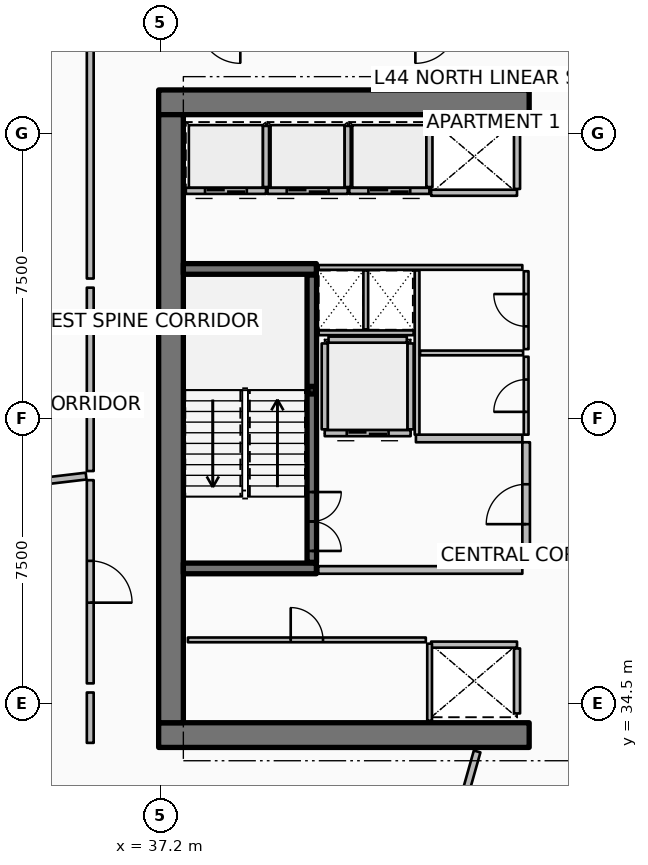
"""IFC4 building model, lengths in metres.
Left out: names, types, materials, properties, quantities, classifications, styles, units other than length and angle.
Written with IfcOpenShell. Run it as: python <this file> out.ifc"""

import sys

from ifc_helpers import new_model, si_unit, direction, frame, frame_2d, origin, origin_2d, place, context, subcontext, project, spatial, rectangle, hollow_rectangle, extrude, element, fill, save


model = new_model("IFC4")
c1 = context("Model", 3, precision=1e-05, world=origin(), true_north=direction((0.0, 1.0)))
c2 = subcontext(c1, "Body", "Model", "MODEL_VIEW")
j1 = project(units=[si_unit("LENGTHUNIT", "METRE"), si_unit("PLANEANGLEUNIT", "RADIAN")], contexts=[c1])
p1 = place(None, origin())
s1 = spatial("IfcSite", under=j1, at=p1, CompositionType="ELEMENT")
p2 = place(p1, origin())
s2 = spatial("IfcBuilding", under=s1, at=p2, CompositionType="ELEMENT")
p3 = place(p2, frame((0.0, 0.0, 176.55)))
s3 = spatial("IfcBuildingStorey", under=s2, at=p3, CompositionType="ELEMENT", Elevation=176.55)
for number, where, z_axis, x_axis in (
    (1, (37.15, 33.675, 0.0), (0.0, 0.0, 1.0), (1.0, 0.0, 0.0)),
    (2, (37.15, 50.325, 0.0), (0.0, 0.0, 1.0), (1.0, 0.0, 0.0)),
):
    element("IfcWall", number, at=place(p3, frame(where, z_axis=z_axis, x_axis=x_axis)), inside=s3, PredefinedType="SHEAR", context=c2, shape_type="SweptSolid", body=[
        extrude(rectangle(XDim=9.75, YDim=0.65, at=frame_2d((4.875, 0.0))), origin(), (0.0, 0.0, 1.0), 3.75),
    ])
p4 = place(p3, frame((37.475, 34.0, 0.0), z_axis=(0.0, 0.0, 1.0), x_axis=(0.0, 1.0, 0.0)))
e3 = element("IfcWall", 3, at=p4, inside=s3, PredefinedType="SHEAR", context=c2, shape_type="SweptSolid", body=[
    extrude(rectangle(XDim=16.0, YDim=0.65, at=frame_2d((8.0, 0.0))), origin(), (0.0, 0.0, 1.0), 3.75),
])
for number, where, z_axis, x_axis in (
    (4, (37.8, 38.06, 0.0), (0.0, 0.0, 1.0), (1.0, 0.0, 0.0)),
    (5, (37.8, 45.94, 0.0), (0.0, 0.0, 1.0), (1.0, 0.0, 0.0)),
):
    element("IfcWall", number, at=place(p3, frame(where, z_axis=z_axis, x_axis=x_axis)), inside=s3, PredefinedType="SHEAR", context=c2, shape_type="SweptSolid", body=[
        extrude(rectangle(XDim=3.5, YDim=0.28, at=frame_2d((1.75, 0.0))), origin(), (0.0, 0.0, 1.0), 3.75),
    ])
p5 = place(p3, frame((41.18, 42.75, 0.0), z_axis=(0.0, 0.0, 1.0), x_axis=(1.0, 0.0, 0.0)))
e6 = element("IfcColumn", 6, at=p5, inside=s3, PredefinedType="COLUMN", context=c2, shape_type="SweptSolid", body=[
    extrude(hollow_rectangle(XDim=0.2, YDim=0.2, WallThickness=0.01, InnerFilletRadius=0.01, OuterFilletRadius=0.02, at=origin_2d()), origin(), (0.0, 0.0, 1.0), 1.67),
])
p6 = place(p3, frame((41.18, 38.22, 0.0), z_axis=(0.0, 0.0, 1.0), x_axis=(0.0, 1.0, 0.0)))
e7 = element("IfcWall", 7, at=p6, inside=s3, PredefinedType="SOLIDWALL", context=c2, shape_type="SweptSolid", body=[
    extrude(rectangle(XDim=7.56, YDim=0.25, at=frame_2d((3.78, 0.0))), origin(), (0.0, 0.0, 1.0), 3.5),
])
p7 = place(p6, frame((0.3, 0.0, 0.0)))
e8 = element("IfcOpeningElement", 8, at=p7, cuts=e7, PredefinedType="OPENING", context=c2, shape_type="SweptSolid", body=[
    extrude(rectangle(XDim=1.55, YDim=2.15, at=frame_2d((0.775, 1.075))), frame((0.0, 0.135, 0.0), z_axis=(0.0, -1.0, 0.0), x_axis=(1.0, 0.0, 0.0)), (0.0, 0.0, 1.0), 0.27),
])
p8 = place(p3, frame((39.975, 47.995, 0.0), z_axis=(0.0, 0.0, 1.0), x_axis=(-1.0, 0.0, 0.0)))
e9 = element("IfcWall", 9, at=p8, inside=s3, PredefinedType="PARTITIONING", context=c2, shape_type="SweptSolid", body=[
    extrude(rectangle(XDim=2.11, YDim=0.16, at=frame_2d((1.055, 0.0))), origin(), (0.0, 0.0, 1.0), 3.5),
])
p9 = place(p8, frame((0.505, 0.0, 0.0)))
e10 = element("IfcOpeningElement", 10, at=p9, cuts=e9, PredefinedType="OPENING", context=c2, shape_type="SweptSolid", body=[
    extrude(rectangle(XDim=1.1, YDim=2.1, at=frame_2d((0.55, 1.05))), frame((0.0, 0.09, 0.0), z_axis=(0.0, -1.0, 0.0), x_axis=(1.0, 0.0, 0.0)), (0.0, 0.0, 1.0), 0.18),
])
p10 = place(p3, frame((39.975, 48.095, 0.0), z_axis=(0.0, 0.0, 1.0), x_axis=(0.0, 1.0, 0.0)))
e11 = element("IfcWall", 11, at=p10, inside=s3, PredefinedType="PARTITIONING", context=c2, shape_type="SweptSolid", body=[
    extrude(rectangle(XDim=1.61, YDim=0.16, at=frame_2d((0.805, 0.0))), origin(), (0.0, 0.0, 1.0), 3.5),
])
p11 = place(p3, frame((42.125, 47.995, 0.0), z_axis=(0.0, 0.0, 1.0), x_axis=(-1.0, 0.0, 0.0)))
e12 = element("IfcWall", 12, at=p11, inside=s3, PredefinedType="PARTITIONING", context=c2, shape_type="SweptSolid", body=[
    extrude(rectangle(XDim=2.11, YDim=0.16, at=frame_2d((1.055, 0.0))), origin(), (0.0, 0.0, 1.0), 3.5),
])
p12 = place(p11, frame((0.505, 0.0, 0.0)))
e13 = element("IfcOpeningElement", 13, at=p12, cuts=e12, PredefinedType="OPENING", context=c2, shape_type="SweptSolid", body=[
    extrude(rectangle(XDim=1.1, YDim=2.1, at=frame_2d((0.55, 1.05))), frame((0.0, 0.09, 0.0), z_axis=(0.0, -1.0, 0.0), x_axis=(1.0, 0.0, 0.0)), (0.0, 0.0, 1.0), 0.18),
])
p13 = place(p3, frame((42.125, 48.095, 0.0), z_axis=(0.0, 0.0, 1.0), x_axis=(0.0, 1.0, 0.0)))
e14 = element("IfcWall", 14, at=p13, inside=s3, PredefinedType="PARTITIONING", context=c2, shape_type="SweptSolid", body=[
    extrude(rectangle(XDim=1.61, YDim=0.16, at=frame_2d((0.805, 0.0))), origin(), (0.0, 0.0, 1.0), 3.5),
])
p14 = place(p3, frame((44.275, 47.995, 0.0), z_axis=(0.0, 0.0, 1.0), x_axis=(-1.0, 0.0, 0.0)))
e15 = element("IfcWall", 15, at=p14, inside=s3, PredefinedType="PARTITIONING", context=c2, shape_type="SweptSolid", body=[
    extrude(rectangle(XDim=2.11, YDim=0.16, at=frame_2d((1.055, 0.0))), origin(), (0.0, 0.0, 1.0), 3.5),
])
p15 = place(p14, frame((0.505, 0.0, 0.0)))
e16 = element("IfcOpeningElement", 16, at=p15, cuts=e15, PredefinedType="OPENING", context=c2, shape_type="SweptSolid", body=[
    extrude(rectangle(XDim=1.1, YDim=2.1, at=frame_2d((0.55, 1.05))), frame((0.0, 0.09, 0.0), z_axis=(0.0, -1.0, 0.0), x_axis=(1.0, 0.0, 0.0)), (0.0, 0.0, 1.0), 0.18),
])
p16 = place(p3, frame((44.275, 48.095, 0.0), z_axis=(0.0, 0.0, 1.0), x_axis=(0.0, 1.0, 0.0)))
e17 = element("IfcWall", 17, at=p16, inside=s3, PredefinedType="PARTITIONING", context=c2, shape_type="SweptSolid", body=[
    extrude(rectangle(XDim=1.61, YDim=0.16, at=frame_2d((0.805, 0.0))), origin(), (0.0, 0.0, 1.0), 3.5),
])
p17 = place(p3, frame((46.58, 47.945, 0.0), z_axis=(0.0, 0.0, 1.0), x_axis=(-1.0, 0.0, 0.0)))
e18 = element("IfcWall", 18, at=p17, inside=s3, PredefinedType="PARTITIONING", context=c2, shape_type="SweptSolid", body=[
    extrude(rectangle(XDim=2.26, YDim=0.16, at=frame_2d((1.13, 0.0))), origin(), (0.0, 0.0, 1.0), 3.5),
])
p18 = place(p3, frame((46.58, 48.045, 0.0), z_axis=(0.0, 0.0, 1.0), x_axis=(0.0, 1.0, 0.0)))
e19 = element("IfcWall", 19, at=p18, inside=s3, PredefinedType="PARTITIONING", context=c2, shape_type="SweptSolid", body=[
    extrude(rectangle(XDim=1.71, YDim=0.16, at=frame_2d((0.855, 0.0))), origin(), (0.0, 0.0, 1.0), 3.5),
])
p19 = place(p3, frame((44.32, 36.055, 0.0), z_axis=(0.0, 0.0, 1.0), x_axis=(1.0, 0.0, 0.0)))
e20 = element("IfcWall", 20, at=p19, inside=s3, PredefinedType="PARTITIONING", context=c2, shape_type="SweptSolid", body=[
    extrude(rectangle(XDim=2.26, YDim=0.16, at=frame_2d((1.13, 0.0))), origin(), (0.0, 0.0, 1.0), 3.5),
])
p20 = place(p3, frame((46.58, 34.245, 0.0), z_axis=(0.0, 0.0, 1.0), x_axis=(0.0, 1.0, 0.0)))
e21 = element("IfcWall", 21, at=p20, inside=s3, PredefinedType="PARTITIONING", context=c2, shape_type="SweptSolid", body=[
    extrude(rectangle(XDim=1.71, YDim=0.16, at=frame_2d((0.855, 0.0))), origin(), (0.0, 0.0, 1.0), 3.5),
])
p21 = place(p3, frame((43.78, 41.62, 0.0), z_axis=(0.0, 0.0, 1.0), x_axis=(-1.0, 0.0, 0.0)))
e22 = element("IfcWall", 22, at=p21, inside=s3, PredefinedType="PARTITIONING", context=c2, shape_type="SweptSolid", body=[
    extrude(rectangle(XDim=2.26, YDim=0.16, at=frame_2d((1.13, 0.0))), origin(), (0.0, 0.0, 1.0), 3.5),
])
p22 = place(p21, frame((0.58, 0.0, 0.0)))
e23 = element("IfcOpeningElement", 23, at=p22, cuts=e22, PredefinedType="OPENING", context=c2, shape_type="SweptSolid", body=[
    extrude(rectangle(XDim=1.1, YDim=2.1, at=frame_2d((0.55, 1.05))), frame((0.0, 0.09, 0.0), z_axis=(0.0, -1.0, 0.0), x_axis=(1.0, 0.0, 0.0)), (0.0, 0.0, 1.0), 0.18),
])
for number, where, z_axis, x_axis in (
    (24, (43.78, 41.72, 0.0), (0.0, 0.0, 1.0), (0.0, 1.0, 0.0)),
    (25, (41.52, 41.72, 0.0), (0.0, 0.0, 1.0), (0.0, 1.0, 0.0)),
):
    element("IfcWall", number, at=place(p3, frame(where, z_axis=z_axis, x_axis=x_axis)), inside=s3, PredefinedType="PARTITIONING", context=c2, shape_type="SweptSolid", body=[
        extrude(rectangle(XDim=2.26, YDim=0.16, at=frame_2d((1.13, 0.0))), origin(), (0.0, 0.0, 1.0), 3.5),
    ])
p23 = place(p3, frame((41.62, 44.08, 0.0), z_axis=(0.0, 0.0, 1.0), x_axis=(1.0, 0.0, 0.0)))
e26 = element("IfcWall", 26, at=p23, inside=s3, PredefinedType="PARTITIONING", context=c2, shape_type="SweptSolid", body=[
    extrude(rectangle(XDim=2.06, YDim=0.16, at=frame_2d((1.03, 0.0))), origin(), (0.0, 0.0, 1.0), 3.5),
])
p24 = place(p3, frame((44.28, 34.05, 0.0), z_axis=(0.0, 0.0, 1.0), x_axis=(0.0, 1.0, 0.0)))
e27 = element("IfcWall", 27, at=p24, inside=s3, PredefinedType="PARTITIONING", context=c2, shape_type="SweptSolid", body=[
    extrude(rectangle(XDim=2.03, YDim=0.125, at=frame_2d((1.015, 0.0))), origin(), (0.0, 0.0, 1.0), 2.94),
])
p25 = place(p3, frame((37.92, 36.18, 0.0), z_axis=(0.0, 0.0, 1.0), x_axis=(1.0, 0.0, 0.0)))
e28 = element("IfcWall", 28, at=p25, inside=s3, PredefinedType="PARTITIONING", context=c2, shape_type="SweptSolid", body=[
    extrude(rectangle(XDim=6.26, YDim=0.125, at=frame_2d((3.13, 0.0))), origin(), (0.0, 0.0, 1.0), 2.94),
])
p26 = place(p25, frame((2.705, 0.0, 0.0)))
e29 = element("IfcOpeningElement", 29, at=p26, cuts=e28, PredefinedType="OPENING", context=c2, shape_type="SweptSolid", body=[
    extrude(rectangle(XDim=0.85, YDim=2.06, at=frame_2d((0.425, 1.03))), frame((0.0, 0.073, 0.0), z_axis=(0.0, -1.0, 0.0), x_axis=(1.0, 0.0, 0.0)), (0.0, 0.0, 1.0), 0.145),
])
p27 = place(p3, frame((41.35, 38.02, 0.0), z_axis=(0.0, 0.0, 1.0), x_axis=(1.0, 0.0, 0.0)))
e30 = element("IfcWall", 30, at=p27, inside=s3, PredefinedType="PARTITIONING", context=c2, shape_type="SweptSolid", body=[
    extrude(rectangle(XDim=5.37, YDim=0.2, at=frame_2d((2.685, 0.0))), origin(), (0.0, 0.0, 1.0), 3.5),
])
p28 = place(p3, frame((43.92, 41.48, 0.0), z_axis=(0.0, 0.0, 1.0), x_axis=(1.0, 0.0, 0.0)))
e31 = element("IfcWall", 31, at=p28, inside=s3, PredefinedType="PARTITIONING", context=c2, shape_type="SweptSolid", body=[
    extrude(rectangle(XDim=2.8, YDim=0.2, at=frame_2d((1.4, 0.0))), origin(), (0.0, 0.0, 1.0), 3.5),
])
p29 = place(p3, frame((46.82, 38.12, 0.0), z_axis=(0.0, 0.0, 1.0), x_axis=(0.0, 1.0, 0.0)))
e32 = element("IfcWall", 32, at=p29, inside=s3, PredefinedType="PARTITIONING", context=c2, shape_type="SweptSolid", body=[
    extrude(rectangle(XDim=3.26, YDim=0.2, at=frame_2d((1.63, 0.0))), origin(), (0.0, 0.0, 1.0), 3.5),
])
p30 = place(p29, frame((1.105, 0.0, 0.0)))
e33 = element("IfcOpeningElement", 33, at=p30, cuts=e32, PredefinedType="OPENING", context=c2, shape_type="SweptSolid", body=[
    extrude(rectangle(XDim=1.05, YDim=2.1, at=frame_2d((0.525, 1.05))), frame((0.0, 0.11, 0.0), z_axis=(0.0, -1.0, 0.0), x_axis=(1.0, 0.0, 0.0)), (0.0, 0.0, 1.0), 0.22),
])
p31 = place(p3, frame((41.36, 45.98, 0.0), z_axis=(0.0, 0.0, 1.0), x_axis=(1.0, 0.0, 0.0)))
e34 = element("IfcWall", 34, at=p31, inside=s3, PredefinedType="PARTITIONING", context=c2, shape_type="SweptSolid", body=[
    extrude(rectangle(XDim=5.36, YDim=0.125, at=frame_2d((2.68, 0.0))), origin(), (0.0, 0.0, 1.0), 2.94),
])
p32 = place(p3, frame((41.36, 44.26, 0.0), z_axis=(0.0, 0.0, 1.0), x_axis=(1.0, 0.0, 0.0)))
e35 = element("IfcWall", 35, at=p32, inside=s3, PredefinedType="PARTITIONING", context=c2, shape_type="SweptSolid", body=[
    extrude(rectangle(XDim=2.5, YDim=0.125, at=frame_2d((1.25, 0.0))), origin(), (0.0, 0.0, 1.0), 2.94),
])
p33 = place(p3, frame((42.6, 44.35, 0.0), z_axis=(0.0, 0.0, 1.0), x_axis=(0.0, 1.0, 0.0)))
e36 = element("IfcWall", 36, at=p33, inside=s3, PredefinedType="PARTITIONING", context=c2, shape_type="SweptSolid", body=[
    extrude(rectangle(XDim=1.55, YDim=0.125, at=frame_2d((0.775, 0.0))), origin(), (0.0, 0.0, 1.0), 2.94),
])
p34 = place(p3, frame((43.95, 41.58, 0.0), z_axis=(0.0, 0.0, 1.0), x_axis=(0.0, 1.0, 0.0)))
e37 = element("IfcWall", 37, at=p34, inside=s3, PredefinedType="PARTITIONING", context=c2, shape_type="SweptSolid", body=[
    extrude(rectangle(XDim=4.32, YDim=0.125, at=frame_2d((2.16, 0.0))), origin(), (0.0, 0.0, 1.0), 2.94),
])
p35 = place(p3, frame((44.03, 43.73, 0.0), z_axis=(0.0, 0.0, 1.0), x_axis=(1.0, 0.0, 0.0)))
e38 = element("IfcWall", 38, at=p35, inside=s3, PredefinedType="PARTITIONING", context=c2, shape_type="SweptSolid", body=[
    extrude(rectangle(XDim=2.71, YDim=0.125, at=frame_2d((1.355, 0.0))), origin(), (0.0, 0.0, 1.0), 2.94),
])
p36 = place(p3, frame((46.82, 41.58, 0.0), z_axis=(0.0, 0.0, 1.0), x_axis=(0.0, 1.0, 0.0)))
e39 = element("IfcWall", 39, at=p36, inside=s3, PredefinedType="PARTITIONING", context=c2, shape_type="SweptSolid", body=[
    extrude(rectangle(XDim=2.05, YDim=0.125, at=frame_2d((1.025, 0.0))), origin(), (0.0, 0.0, 1.0), 2.94),
])
p37 = place(p36, frame((0.6, 0.0, 0.0)))
e40 = element("IfcOpeningElement", 40, at=p37, cuts=e39, PredefinedType="OPENING", context=c2, shape_type="SweptSolid", body=[
    extrude(rectangle(XDim=0.85, YDim=2.06, at=frame_2d((0.425, 1.03))), frame((0.0, 0.073, 0.0), z_axis=(0.0, -1.0, 0.0), x_axis=(1.0, 0.0, 0.0)), (0.0, 0.0, 1.0), 0.145),
])
p38 = place(p3, frame((46.82, 43.83, 0.0), z_axis=(0.0, 0.0, 1.0), x_axis=(0.0, 1.0, 0.0)))
e41 = element("IfcWall", 41, at=p38, inside=s3, PredefinedType="PARTITIONING", context=c2, shape_type="SweptSolid", body=[
    extrude(rectangle(XDim=2.05, YDim=0.125, at=frame_2d((1.025, 0.0))), origin(), (0.0, 0.0, 1.0), 2.94),
])
p39 = place(p38, frame((0.6, 0.0, 0.0)))
e42 = element("IfcOpeningElement", 42, at=p39, cuts=e41, PredefinedType="OPENING", context=c2, shape_type="SweptSolid", body=[
    extrude(rectangle(XDim=0.85, YDim=2.06, at=frame_2d((0.425, 1.03))), frame((0.0, 0.073, 0.0), z_axis=(0.0, -1.0, 0.0), x_axis=(1.0, 0.0, 0.0)), (0.0, 0.0, 1.0), 0.145),
])
p40 = place(p3, frame((35.241, 40.49, 0.0), z_axis=(0.0, 0.0, 1.0), x_axis=(-0.993066731786, -0.117551972417, 0.0)))
e43 = element("IfcWall", 43, at=p40, inside=s3, PredefinedType="PARTITIONING", context=c2, shape_type="SweptSolid", body=[
    extrude(rectangle(XDim=15.047, YDim=0.18, at=frame_2d((7.523, 0.0))), origin(), (0.0, 0.0, 1.0), 2.94),
])
p41 = place(p3, frame((45.531, 33.244, 0.0), z_axis=(0.0, 0.0, 1.0), x_axis=(-0.271437162306, -0.962456163635, 0.0)))
e44 = element("IfcWall", 44, at=p41, inside=s3, PredefinedType="PARTITIONING", context=c2, shape_type="SweptSolid", body=[
    extrude(rectangle(XDim=15.63, YDim=0.18, at=frame_2d((7.815, 0.0))), origin(), (0.0, 0.0, 1.0), 2.94),
])
p42 = place(p3, frame((35.35, 51.853, 0.0), z_axis=(0.0, 0.0, 1.0), x_axis=(0.0, -1.0, 0.0)))
e45 = element("IfcWall", 45, at=p42, inside=s3, PredefinedType="PARTITIONING", context=c2, shape_type="SweptSolid", body=[
    extrude(rectangle(XDim=6.165, YDim=0.18, at=frame_2d((3.083, 0.0))), origin(), (0.0, 0.0, 1.0), 2.94),
])
p43 = place(p3, frame((35.35, 45.448, 0.0), z_axis=(0.0, 0.0, 1.0), x_axis=(0.0, -1.0, 0.0)))
e46 = element("IfcWall", 46, at=p43, inside=s3, PredefinedType="PARTITIONING", context=c2, shape_type="SweptSolid", body=[
    extrude(rectangle(XDim=4.825, YDim=0.18, at=frame_2d((2.413, 0.0))), origin(), (0.0, 0.0, 1.0), 2.94),
])
p44 = place(p3, frame((35.35, 40.383, 0.0), z_axis=(0.0, 0.0, 1.0), x_axis=(0.0, -1.0, 0.0)))
e47 = element("IfcWall", 47, at=p44, inside=s3, PredefinedType="PARTITIONING", context=c2, shape_type="SweptSolid", body=[
    extrude(rectangle(XDim=5.347, YDim=0.18, at=frame_2d((2.674, 0.0))), origin(), (0.0, 0.0, 1.0), 2.94),
])
p45 = place(p44, frame((2.124, 0.0, 0.0)))
e48 = element("IfcOpeningElement", 48, at=p45, cuts=e47, PredefinedType="OPENING", context=c2, shape_type="SweptSolid", body=[
    extrude(rectangle(XDim=1.1, YDim=2.1, at=frame_2d((0.55, 1.05))), frame((0.0, 0.1, 0.0), z_axis=(0.0, -1.0, 0.0), x_axis=(1.0, 0.0, 0.0)), (0.0, 0.0, 1.0), 0.2),
])
p46 = place(p3, frame((35.35, 34.796, 0.0), z_axis=(0.0, 0.0, 1.0), x_axis=(0.0, -1.0, 0.0)))
e49 = element("IfcWall", 49, at=p46, inside=s3, PredefinedType="PARTITIONING", context=c2, shape_type="SweptSolid", body=[
    extrude(rectangle(XDim=1.326, YDim=0.18, at=frame_2d((0.663, 0.0))), origin(), (0.0, 0.0, 1.0), 2.94),
])
p47 = place(p7, origin())
e50 = element("IfcDoor", 50, at=p47, inside=s3, OperationType="DOUBLE_DOOR_SINGLE_SWING", PredefinedType="DOOR", context=c2, shape_type="SweptSolid", body=[
    extrude(rectangle(XDim=1.55, YDim=2.15, at=frame_2d((0.775, 1.075))), frame((0.0, 0.025, 0.0), z_axis=(0.0, -1.0, 0.0), x_axis=(1.0, 0.0, 0.0)), (0.0, 0.0, 1.0), 0.05),
])
fill(e8, e50)
p48 = place(p9, origin())
e51 = element("IfcDoor", 51, at=p48, inside=s3, OperationType="DOUBLE_DOOR_SLIDING", PredefinedType="DOOR", context=c2, shape_type="SweptSolid", body=[
    extrude(rectangle(XDim=1.1, YDim=2.1, at=frame_2d((0.55, 1.05))), frame((0.0, 0.025, 0.0), z_axis=(0.0, -1.0, 0.0), x_axis=(1.0, 0.0, 0.0)), (0.0, 0.0, 1.0), 0.05),
])
fill(e10, e51)
p49 = place(p12, origin())
e52 = element("IfcDoor", 52, at=p49, inside=s3, OperationType="DOUBLE_DOOR_SLIDING", PredefinedType="DOOR", context=c2, shape_type="SweptSolid", body=[
    extrude(rectangle(XDim=1.1, YDim=2.1, at=frame_2d((0.55, 1.05))), frame((0.0, 0.025, 0.0), z_axis=(0.0, -1.0, 0.0), x_axis=(1.0, 0.0, 0.0)), (0.0, 0.0, 1.0), 0.05),
])
fill(e13, e52)
p50 = place(p15, origin())
e53 = element("IfcDoor", 53, at=p50, inside=s3, OperationType="DOUBLE_DOOR_SLIDING", PredefinedType="DOOR", context=c2, shape_type="SweptSolid", body=[
    extrude(rectangle(XDim=1.1, YDim=2.1, at=frame_2d((0.55, 1.05))), frame((0.0, 0.025, 0.0), z_axis=(0.0, -1.0, 0.0), x_axis=(1.0, 0.0, 0.0)), (0.0, 0.0, 1.0), 0.05),
])
fill(e16, e53)
p51 = place(p22, origin())
e54 = element("IfcDoor", 54, at=p51, inside=s3, OperationType="DOUBLE_DOOR_SLIDING", PredefinedType="DOOR", context=c2, shape_type="SweptSolid", body=[
    extrude(rectangle(XDim=1.1, YDim=2.1, at=frame_2d((0.55, 1.05))), frame((0.0, 0.025, 0.0), z_axis=(0.0, -1.0, 0.0), x_axis=(1.0, 0.0, 0.0)), (0.0, 0.0, 1.0), 0.05),
])
fill(e23, e54)
p52 = place(p26, origin())
e55 = element("IfcDoor", 55, at=p52, inside=s3, OperationType="SINGLE_SWING_LEFT", PredefinedType="DOOR", context=c2, shape_type="SweptSolid", body=[
    extrude(rectangle(XDim=0.85, YDim=2.06, at=frame_2d((0.425, 1.03))), frame((0.0, 0.025, 0.0), z_axis=(0.0, -1.0, 0.0), x_axis=(1.0, 0.0, 0.0)), (0.0, 0.0, 1.0), 0.05),
])
fill(e29, e55)
p53 = place(p30, origin())
e56 = element("IfcDoor", 56, at=p53, inside=s3, OperationType="SINGLE_SWING_LEFT", PredefinedType="DOOR", context=c2, shape_type="SweptSolid", body=[
    extrude(rectangle(XDim=1.05, YDim=2.1, at=frame_2d((0.525, 1.05))), frame((0.0, 0.025, 0.0), z_axis=(0.0, -1.0, 0.0), x_axis=(1.0, 0.0, 0.0)), (0.0, 0.0, 1.0), 0.05),
])
fill(e33, e56)
p54 = place(p37, origin())
e57 = element("IfcDoor", 57, at=p54, inside=s3, OperationType="SINGLE_SWING_LEFT", PredefinedType="DOOR", context=c2, shape_type="SweptSolid", body=[
    extrude(rectangle(XDim=0.85, YDim=2.06, at=frame_2d((0.425, 1.03))), frame((0.0, 0.025, 0.0), z_axis=(0.0, -1.0, 0.0), x_axis=(1.0, 0.0, 0.0)), (0.0, 0.0, 1.0), 0.05),
])
fill(e40, e57)
p55 = place(p39, origin())
e58 = element("IfcDoor", 58, at=p55, inside=s3, OperationType="SINGLE_SWING_RIGHT", PredefinedType="DOOR", context=c2, shape_type="SweptSolid", body=[
    extrude(rectangle(XDim=0.85, YDim=2.06, at=frame_2d((0.425, 1.03))), frame((0.0, 0.025, 0.0), z_axis=(0.0, -1.0, 0.0), x_axis=(1.0, 0.0, 0.0)), (0.0, 0.0, 1.0), 0.05),
])
fill(e42, e58)
p56 = place(p45, origin())
e59 = element("IfcDoor", 59, at=p56, inside=s3, OperationType="SINGLE_SWING_RIGHT", PredefinedType="DOOR", context=c2, shape_type="SweptSolid", body=[
    extrude(rectangle(XDim=1.1, YDim=2.1, at=frame_2d((0.55, 1.05))), frame((0.0, 0.025, 0.0), z_axis=(0.0, -1.0, 0.0), x_axis=(1.0, 0.0, 0.0)), (0.0, 0.0, 1.0), 0.05),
])
fill(e48, e59)
save(model, sys.argv[1])
